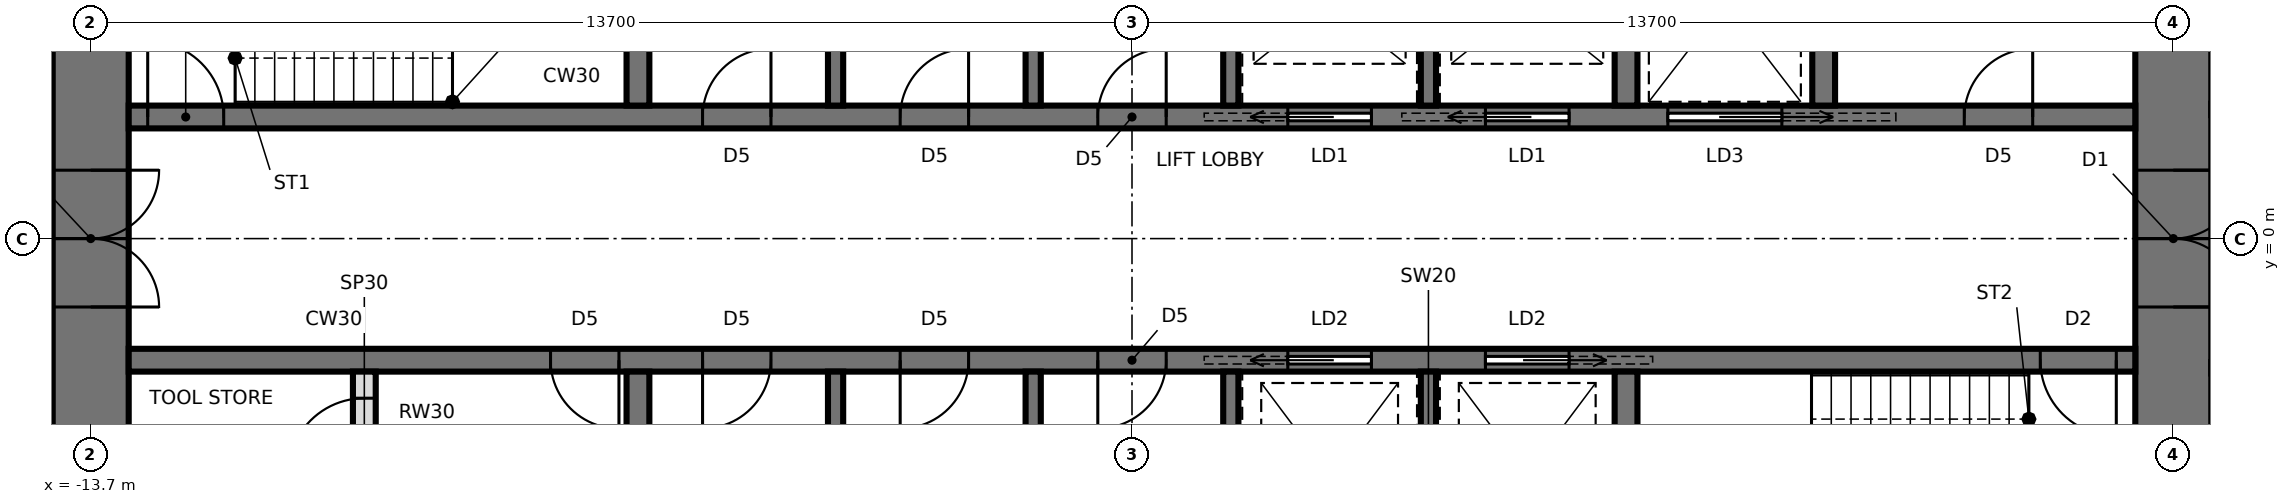
"""IFC4 building model, lengths in metres.
Left out: names, types, materials, properties, quantities, classifications, styles, units other than length and angle.
Written with IfcOpenShell. Run it as: python <this file> out.ifc"""

import sys

from ifc_helpers import new_model, si_unit, direction, frame, frame_2d, origin, place, context, subcontext, project, spatial, rectangle, extrude, element, fill, save


model = new_model("IFC4")
c1 = context("Model", 3, precision=1e-05, world=origin(), true_north=direction((0.0, 1.0)))
c2 = subcontext(c1, "Body", "Model", "MODEL_VIEW")
j1 = project(units=[si_unit("LENGTHUNIT", "METRE"), si_unit("PLANEANGLEUNIT", "RADIAN")], contexts=[c1])
p1 = place(None, origin())
s1 = spatial("IfcSite", under=j1, at=p1, CompositionType="ELEMENT")
p2 = place(p1, origin())
s2 = spatial("IfcBuilding", under=s1, at=p2, CompositionType="ELEMENT")
p3 = place(p2, frame((0.0, 0.0, 256.0)))
s3 = spatial("IfcBuildingStorey", under=s2, at=p3, CompositionType="ELEMENT", Elevation=256.0)
p4 = place(p3, frame((13.7, -9.5, 0.0), z_axis=(0.0, 0.0, 1.0), x_axis=(0.0, 1.0, 0.0)))
e1 = element("IfcWall", 1, at=p4, inside=s3, PredefinedType="SHEAR", context=c2, shape_type="SweptSolid", body=[
    extrude(rectangle(XDim=19.0, YDim=1.0, at=frame_2d((9.5, 0.0))), origin(), (0.0, 0.0, 1.0), 4.2),
])
p5 = place(p4, frame((8.6, 0.0, 0.0)))
e2 = element("IfcOpeningElement", 2, at=p5, cuts=e1, PredefinedType="OPENING", context=c2, shape_type="SweptSolid", body=[
    extrude(rectangle(XDim=1.8, YDim=2.4, at=frame_2d((0.9, 1.2))), frame((0.0, 0.51, 0.0), z_axis=(0.0, -1.0, 0.0), x_axis=(1.0, 0.0, 0.0)), (0.0, 0.0, 1.0), 1.02),
])
p6 = place(p3, frame((-13.7, 9.5, 0.0), z_axis=(0.0, 0.0, 1.0), x_axis=(0.0, -1.0, 0.0)))
e3 = element("IfcWall", 3, at=p6, inside=s3, PredefinedType="SHEAR", context=c2, shape_type="SweptSolid", body=[
    extrude(rectangle(XDim=19.0, YDim=1.0, at=frame_2d((9.5, 0.0))), origin(), (0.0, 0.0, 1.0), 4.2),
])
p7 = place(p6, frame((8.6, 0.0, 0.0)))
e4 = element("IfcOpeningElement", 4, at=p7, cuts=e3, PredefinedType="OPENING", context=c2, shape_type="SweptSolid", body=[
    extrude(rectangle(XDim=1.8, YDim=2.4, at=frame_2d((0.9, 1.2))), frame((0.0, 0.51, 0.0), z_axis=(0.0, -1.0, 0.0), x_axis=(1.0, 0.0, 0.0)), (0.0, 0.0, 1.0), 1.02),
])
p8 = place(p3, frame((-13.2, 1.6, 0.0), z_axis=(0.0, 0.0, 1.0), x_axis=(1.0, 0.0, 0.0)))
e5 = element("IfcWall", 5, at=p8, inside=s3, PredefinedType="SHEAR", context=c2, shape_type="SweptSolid", body=[
    extrude(rectangle(XDim=26.4, YDim=0.3, at=frame_2d((13.2, 0.0))), origin(), (0.0, 0.0, 1.0), 4.2),
])
p9 = place(p8, frame((0.25, 0.0, 0.0)))
e6 = element("IfcOpeningElement", 6, at=p9, cuts=e5, PredefinedType="OPENING", context=c2, shape_type="SweptSolid", body=[
    extrude(rectangle(XDim=1.0, YDim=2.1, at=frame_2d((0.5, 1.05))), frame((0.0, 0.16, 0.0), z_axis=(0.0, -1.0, 0.0), x_axis=(1.0, 0.0, 0.0)), (0.0, 0.0, 1.0), 0.32),
])
p10 = place(p8, frame((20.25, 0.0, 0.0)))
e7 = element("IfcOpeningElement", 7, at=p10, cuts=e5, PredefinedType="OPENING", context=c2, shape_type="SweptSolid", body=[
    extrude(rectangle(XDim=1.5, YDim=2.4, at=frame_2d((0.75, 1.2))), frame((0.0, 0.16, 0.0), z_axis=(0.0, -1.0, 0.0), x_axis=(1.0, 0.0, 0.0)), (0.0, 0.0, 1.0), 0.32),
])
p11 = place(p8, frame((7.55, 0.0, 0.0)))
e8 = element("IfcOpeningElement", 8, at=p11, cuts=e5, PredefinedType="OPENING", context=c2, shape_type="SweptSolid", body=[
    extrude(rectangle(XDim=0.9, YDim=2.1, at=frame_2d((0.45, 1.05))), frame((0.0, 0.16, 0.0), z_axis=(0.0, -1.0, 0.0), x_axis=(1.0, 0.0, 0.0)), (0.0, 0.0, 1.0), 0.32),
])
p12 = place(p8, frame((10.15, 0.0, 0.0)))
e9 = element("IfcOpeningElement", 9, at=p12, cuts=e5, PredefinedType="OPENING", context=c2, shape_type="SweptSolid", body=[
    extrude(rectangle(XDim=0.9, YDim=2.1, at=frame_2d((0.45, 1.05))), frame((0.0, 0.16, 0.0), z_axis=(0.0, -1.0, 0.0), x_axis=(1.0, 0.0, 0.0)), (0.0, 0.0, 1.0), 0.32),
])
p13 = place(p8, frame((12.75, 0.0, 0.0)))
e10 = element("IfcOpeningElement", 10, at=p13, cuts=e5, PredefinedType="OPENING", context=c2, shape_type="SweptSolid", body=[
    extrude(rectangle(XDim=0.9, YDim=2.1, at=frame_2d((0.45, 1.05))), frame((0.0, 0.16, 0.0), z_axis=(0.0, -1.0, 0.0), x_axis=(1.0, 0.0, 0.0)), (0.0, 0.0, 1.0), 0.32),
])
p14 = place(p8, frame((15.25, 0.0, 0.0)))
e11 = element("IfcOpeningElement", 11, at=p14, cuts=e5, PredefinedType="OPENING", context=c2, shape_type="SweptSolid", body=[
    extrude(rectangle(XDim=1.1, YDim=2.3, at=frame_2d((0.55, 1.15))), frame((0.0, 0.16, 0.0), z_axis=(0.0, -1.0, 0.0), x_axis=(1.0, 0.0, 0.0)), (0.0, 0.0, 1.0), 0.32),
])
p15 = place(p8, frame((17.85, 0.0, 0.0)))
e12 = element("IfcOpeningElement", 12, at=p15, cuts=e5, PredefinedType="OPENING", context=c2, shape_type="SweptSolid", body=[
    extrude(rectangle(XDim=1.1, YDim=2.3, at=frame_2d((0.55, 1.15))), frame((0.0, 0.16, 0.0), z_axis=(0.0, -1.0, 0.0), x_axis=(1.0, 0.0, 0.0)), (0.0, 0.0, 1.0), 0.32),
])
p16 = place(p8, frame((24.15, 0.0, 0.0)))
e13 = element("IfcOpeningElement", 13, at=p16, cuts=e5, PredefinedType="OPENING", context=c2, shape_type="SweptSolid", body=[
    extrude(rectangle(XDim=0.9, YDim=2.1, at=frame_2d((0.45, 1.05))), frame((0.0, 0.16, 0.0), z_axis=(0.0, -1.0, 0.0), x_axis=(1.0, 0.0, 0.0)), (0.0, 0.0, 1.0), 0.32),
])
p17 = place(p3, frame((-13.2, -1.6, 0.0), z_axis=(0.0, 0.0, 1.0), x_axis=(1.0, 0.0, 0.0)))
e14 = element("IfcWall", 14, at=p17, inside=s3, PredefinedType="SHEAR", context=c2, shape_type="SweptSolid", body=[
    extrude(rectangle(XDim=26.4, YDim=0.3, at=frame_2d((13.2, 0.0))), origin(), (0.0, 0.0, 1.0), 4.2),
])
p18 = place(p17, frame((25.15, 0.0, 0.0)))
e15 = element("IfcOpeningElement", 15, at=p18, cuts=e14, PredefinedType="OPENING", context=c2, shape_type="SweptSolid", body=[
    extrude(rectangle(XDim=1.0, YDim=2.1, at=frame_2d((0.5, 1.05))), frame((0.0, 0.16, 0.0), z_axis=(0.0, -1.0, 0.0), x_axis=(1.0, 0.0, 0.0)), (0.0, 0.0, 1.0), 0.32),
])
p19 = place(p17, frame((7.55, 0.0, 0.0)))
e16 = element("IfcOpeningElement", 16, at=p19, cuts=e14, PredefinedType="OPENING", context=c2, shape_type="SweptSolid", body=[
    extrude(rectangle(XDim=0.9, YDim=2.1, at=frame_2d((0.45, 1.05))), frame((0.0, 0.16, 0.0), z_axis=(0.0, -1.0, 0.0), x_axis=(1.0, 0.0, 0.0)), (0.0, 0.0, 1.0), 0.32),
])
p20 = place(p17, frame((10.15, 0.0, 0.0)))
e17 = element("IfcOpeningElement", 17, at=p20, cuts=e14, PredefinedType="OPENING", context=c2, shape_type="SweptSolid", body=[
    extrude(rectangle(XDim=0.9, YDim=2.1, at=frame_2d((0.45, 1.05))), frame((0.0, 0.16, 0.0), z_axis=(0.0, -1.0, 0.0), x_axis=(1.0, 0.0, 0.0)), (0.0, 0.0, 1.0), 0.32),
])
p21 = place(p17, frame((12.75, 0.0, 0.0)))
e18 = element("IfcOpeningElement", 18, at=p21, cuts=e14, PredefinedType="OPENING", context=c2, shape_type="SweptSolid", body=[
    extrude(rectangle(XDim=0.9, YDim=2.1, at=frame_2d((0.45, 1.05))), frame((0.0, 0.16, 0.0), z_axis=(0.0, -1.0, 0.0), x_axis=(1.0, 0.0, 0.0)), (0.0, 0.0, 1.0), 0.32),
])
p22 = place(p17, frame((15.25, 0.0, 0.0)))
e19 = element("IfcOpeningElement", 19, at=p22, cuts=e14, PredefinedType="OPENING", context=c2, shape_type="SweptSolid", body=[
    extrude(rectangle(XDim=1.1, YDim=2.3, at=frame_2d((0.55, 1.15))), frame((0.0, 0.16, 0.0), z_axis=(0.0, -1.0, 0.0), x_axis=(1.0, 0.0, 0.0)), (0.0, 0.0, 1.0), 0.32),
])
p23 = place(p17, frame((17.85, 0.0, 0.0)))
e20 = element("IfcOpeningElement", 20, at=p23, cuts=e14, PredefinedType="OPENING", context=c2, shape_type="SweptSolid", body=[
    extrude(rectangle(XDim=1.1, YDim=2.3, at=frame_2d((0.55, 1.15))), frame((0.0, 0.16, 0.0), z_axis=(0.0, -1.0, 0.0), x_axis=(1.0, 0.0, 0.0)), (0.0, 0.0, 1.0), 0.32),
])
p24 = place(p17, frame((5.55, 0.0, 0.0)))
e21 = element("IfcOpeningElement", 21, at=p24, cuts=e14, PredefinedType="OPENING", context=c2, shape_type="SweptSolid", body=[
    extrude(rectangle(XDim=0.9, YDim=2.1, at=frame_2d((0.45, 1.05))), frame((0.0, 0.16, 0.0), z_axis=(0.0, -1.0, 0.0), x_axis=(1.0, 0.0, 0.0)), (0.0, 0.0, 1.0), 0.32),
])
for number, where, z_axis, x_axis in (
    (22, (-6.5, 1.75, 0.0), (0.0, 0.0, 1.0), (0.0, 1.0, 0.0)),
    (23, (6.5, 1.75, 0.0), (0.0, 0.0, 1.0), (0.0, 1.0, 0.0)),
):
    element("IfcWall", number, at=place(p3, frame(where, z_axis=z_axis, x_axis=x_axis)), inside=s3, PredefinedType="SHEAR", context=c2, shape_type="SweptSolid", body=[
        extrude(rectangle(XDim=2.7, YDim=0.3, at=frame_2d((1.35, 0.0))), origin(), (0.0, 0.0, 1.0), 4.2),
    ])
for number, where, z_axis, x_axis in (
    (24, (-3.9, 1.75, 0.0), (0.0, 0.0, 1.0), (0.0, 1.0, 0.0)),
    (25, (-1.3, 1.75, 0.0), (0.0, 0.0, 1.0), (0.0, 1.0, 0.0)),
    (26, (1.3, 1.75, 0.0), (0.0, 0.0, 1.0), (0.0, 1.0, 0.0)),
    (27, (3.9, 1.75, 0.0), (0.0, 0.0, 1.0), (0.0, 1.0, 0.0)),
):
    element("IfcWall", number, at=place(p3, frame(where, z_axis=z_axis, x_axis=x_axis)), inside=s3, PredefinedType="SHEAR", context=c2, shape_type="SweptSolid", body=[
        extrude(rectangle(XDim=2.7, YDim=0.2, at=frame_2d((1.35, 0.0))), origin(), (0.0, 0.0, 1.0), 4.2),
    ])
for number, where, z_axis, x_axis in (
    (28, (-6.5, -1.75, 0.0), (0.0, 0.0, 1.0), (0.0, -1.0, 0.0)),
    (29, (6.5, -1.75, 0.0), (0.0, 0.0, 1.0), (0.0, -1.0, 0.0)),
):
    element("IfcWall", number, at=place(p3, frame(where, z_axis=z_axis, x_axis=x_axis)), inside=s3, PredefinedType="SHEAR", context=c2, shape_type="SweptSolid", body=[
        extrude(rectangle(XDim=2.7, YDim=0.3, at=frame_2d((1.35, 0.0))), origin(), (0.0, 0.0, 1.0), 4.2),
    ])
for number, where, z_axis, x_axis in (
    (30, (-3.9, -1.75, 0.0), (0.0, 0.0, 1.0), (0.0, -1.0, 0.0)),
    (31, (-1.3, -1.75, 0.0), (0.0, 0.0, 1.0), (0.0, -1.0, 0.0)),
    (32, (1.3, -1.75, 0.0), (0.0, 0.0, 1.0), (0.0, -1.0, 0.0)),
    (33, (3.9, -1.75, 0.0), (0.0, 0.0, 1.0), (0.0, -1.0, 0.0)),
):
    element("IfcWall", number, at=place(p3, frame(where, z_axis=z_axis, x_axis=x_axis)), inside=s3, PredefinedType="SHEAR", context=c2, shape_type="SweptSolid", body=[
        extrude(rectangle(XDim=2.7, YDim=0.2, at=frame_2d((1.35, 0.0))), origin(), (0.0, 0.0, 1.0), 4.2),
    ])
p25 = place(p3, frame((9.1, 1.75, 0.0), z_axis=(0.0, 0.0, 1.0), x_axis=(0.0, 1.0, 0.0)))
e34 = element("IfcWall", 34, at=p25, inside=s3, PredefinedType="SHEAR", context=c2, shape_type="SweptSolid", body=[
    extrude(rectangle(XDim=2.7, YDim=0.3, at=frame_2d((1.35, 0.0))), origin(), (0.0, 0.0, 1.0), 4.2),
])
p26 = place(p3, frame((-10.1, -3.25, 0.0), z_axis=(0.0, 0.0, 1.0), x_axis=(0.0, 1.0, 0.0)))
e35 = element("IfcWall", 35, at=p26, inside=s3, PredefinedType="PARTITIONING", context=c2, shape_type="SweptSolid", body=[
    extrude(rectangle(XDim=1.5, YDim=0.3, at=frame_2d((0.75, 0.0))), origin(), (0.0, 0.0, 1.0), 4.04),
])
p27 = place(p26, frame((0.15, 0.0, 0.0)))
e36 = element("IfcOpeningElement", 36, at=p27, cuts=e35, PredefinedType="OPENING", context=c2, shape_type="SweptSolid", body=[
    extrude(rectangle(XDim=1.0, YDim=2.4, at=frame_2d((0.5, 1.2))), frame((0.0, 0.16, 0.0), z_axis=(0.0, -1.0, 0.0), x_axis=(1.0, 0.0, 0.0)), (0.0, 0.0, 1.0), 0.32),
])
p28 = place(p3, frame((19.6, 1.7, 0.0), z_axis=(0.0, 0.0, 1.0), x_axis=(-1.0, 0.0, 0.0)))
e37 = element("IfcWall", 37, at=p28, inside=s3, PredefinedType="PARTITIONING", context=c2, shape_type="SweptSolid", body=[
    extrude(rectangle(XDim=5.4, YDim=0.15, at=frame_2d((2.7, 0.0))), origin(), (0.0, 0.0, 1.0), 4.04),
])
p29 = place(p7, origin())
e38 = element("IfcDoor", 38, at=p29, inside=s3, OperationType="DOUBLE_DOOR_SINGLE_SWING", PredefinedType="DOOR", context=c2, shape_type="SweptSolid", body=[
    extrude(rectangle(XDim=1.72, YDim=2.36, at=frame_2d((0.9, 1.18))), frame((0.0, 0.025, 0.0), z_axis=(0.0, -1.0, 0.0), x_axis=(1.0, 0.0, 0.0)), (0.0, 0.0, 1.0), 0.05),
    extrude(rectangle(XDim=0.04, YDim=2.4, at=frame_2d((0.02, 1.2))), frame((0.0, 0.25, 0.0), z_axis=(0.0, -1.0, 0.0), x_axis=(1.0, 0.0, 0.0)), (0.0, 0.0, 1.0), 0.5),
    extrude(rectangle(XDim=0.04, YDim=2.4, at=frame_2d((1.78, 1.2))), frame((0.0, 0.25, 0.0), z_axis=(0.0, -1.0, 0.0), x_axis=(1.0, 0.0, 0.0)), (0.0, 0.0, 1.0), 0.5),
    extrude(rectangle(XDim=1.72, YDim=0.04, at=frame_2d((0.9, 2.38))), frame((0.0, 0.25, 0.0), z_axis=(0.0, -1.0, 0.0), x_axis=(1.0, 0.0, 0.0)), (0.0, 0.0, 1.0), 0.5),
])
fill(e4, e38)
p30 = place(p5, frame((1.8, 0.0, 0.0), z_axis=(0.0, 0.0, 1.0), x_axis=(-1.0, 0.0, 0.0)))
e39 = element("IfcDoor", 39, at=p30, inside=s3, OperationType="DOUBLE_DOOR_SINGLE_SWING", PredefinedType="DOOR", context=c2, shape_type="SweptSolid", body=[
    extrude(rectangle(XDim=1.72, YDim=2.36, at=frame_2d((0.9, 1.18))), frame((0.0, 0.025, 0.0), z_axis=(0.0, -1.0, 0.0), x_axis=(1.0, 0.0, 0.0)), (0.0, 0.0, 1.0), 0.05),
    extrude(rectangle(XDim=0.04, YDim=2.4, at=frame_2d((1.78, 1.2))), frame((0.0, 0.25, 0.0), z_axis=(0.0, -1.0, 0.0), x_axis=(1.0, 0.0, 0.0)), (0.0, 0.0, 1.0), 0.5),
    extrude(rectangle(XDim=0.04, YDim=2.4, at=frame_2d((0.02, 1.2))), frame((0.0, 0.25, 0.0), z_axis=(0.0, -1.0, 0.0), x_axis=(1.0, 0.0, 0.0)), (0.0, 0.0, 1.0), 0.5),
    extrude(rectangle(XDim=1.72, YDim=0.04, at=frame_2d((0.9, 2.38))), frame((0.0, 0.25, 0.0), z_axis=(0.0, -1.0, 0.0), x_axis=(1.0, 0.0, 0.0)), (0.0, 0.0, 1.0), 0.5),
])
fill(e2, e39)
p31 = place(p9, origin())
e40 = element("IfcDoor", 40, at=p31, inside=s3, OperationType="SINGLE_SWING_LEFT", PredefinedType="DOOR", context=c2, shape_type="SweptSolid", body=[
    extrude(rectangle(XDim=1.0, YDim=2.1, at=frame_2d((0.5, 1.05))), frame((0.0, 0.025, 0.0), z_axis=(0.0, -1.0, 0.0), x_axis=(1.0, 0.0, 0.0)), (0.0, 0.0, 1.0), 0.05),
])
fill(e6, e40)
p32 = place(p18, frame((1.0, 0.0, 0.0), z_axis=(0.0, 0.0, 1.0), x_axis=(-1.0, 0.0, 0.0)))
e41 = element("IfcDoor", 41, at=p32, inside=s3, OperationType="SINGLE_SWING_LEFT", PredefinedType="DOOR", context=c2, shape_type="SweptSolid", body=[
    extrude(rectangle(XDim=1.0, YDim=2.1, at=frame_2d((0.5, 1.05))), frame((0.0, 0.025, 0.0), z_axis=(0.0, -1.0, 0.0), x_axis=(1.0, 0.0, 0.0)), (0.0, 0.0, 1.0), 0.05),
])
fill(e15, e41)
p33 = place(p10, origin())
e42 = element("IfcDoor", 42, at=p33, inside=s3, OperationType="SLIDING_TO_RIGHT", PredefinedType="DOOR", context=c2, shape_type="SweptSolid", body=[
    extrude(rectangle(XDim=1.5, YDim=2.4, at=frame_2d((0.75, 1.2))), frame((0.0, 0.025, 0.0), z_axis=(0.0, -1.0, 0.0), x_axis=(1.0, 0.0, 0.0)), (0.0, 0.0, 1.0), 0.05),
])
fill(e7, e42)
p34 = place(p11, origin())
e43 = element("IfcDoor", 43, at=p34, inside=s3, OperationType="SINGLE_SWING_RIGHT", PredefinedType="DOOR", context=c2, shape_type="SweptSolid", body=[
    extrude(rectangle(XDim=0.9, YDim=2.1, at=frame_2d((0.45, 1.05))), frame((0.0, 0.025, 0.0), z_axis=(0.0, -1.0, 0.0), x_axis=(1.0, 0.0, 0.0)), (0.0, 0.0, 1.0), 0.05),
])
fill(e8, e43)
p35 = place(p12, origin())
e44 = element("IfcDoor", 44, at=p35, inside=s3, OperationType="SINGLE_SWING_RIGHT", PredefinedType="DOOR", context=c2, shape_type="SweptSolid", body=[
    extrude(rectangle(XDim=0.9, YDim=2.1, at=frame_2d((0.45, 1.05))), frame((0.0, 0.025, 0.0), z_axis=(0.0, -1.0, 0.0), x_axis=(1.0, 0.0, 0.0)), (0.0, 0.0, 1.0), 0.05),
])
fill(e9, e44)
p36 = place(p13, origin())
e45 = element("IfcDoor", 45, at=p36, inside=s3, OperationType="SINGLE_SWING_RIGHT", PredefinedType="DOOR", context=c2, shape_type="SweptSolid", body=[
    extrude(rectangle(XDim=0.9, YDim=2.1, at=frame_2d((0.45, 1.05))), frame((0.0, 0.025, 0.0), z_axis=(0.0, -1.0, 0.0), x_axis=(1.0, 0.0, 0.0)), (0.0, 0.0, 1.0), 0.05),
])
fill(e10, e45)
p37 = place(p14, origin())
e46 = element("IfcDoor", 46, at=p37, inside=s3, OperationType="SLIDING_TO_LEFT", PredefinedType="DOOR", context=c2, shape_type="SweptSolid", body=[
    extrude(rectangle(XDim=1.1, YDim=2.3, at=frame_2d((0.55, 1.15))), frame((0.0, 0.025, 0.0), z_axis=(0.0, -1.0, 0.0), x_axis=(1.0, 0.0, 0.0)), (0.0, 0.0, 1.0), 0.05),
])
fill(e11, e46)
p38 = place(p15, origin())
e47 = element("IfcDoor", 47, at=p38, inside=s3, OperationType="SLIDING_TO_LEFT", PredefinedType="DOOR", context=c2, shape_type="SweptSolid", body=[
    extrude(rectangle(XDim=1.1, YDim=2.3, at=frame_2d((0.55, 1.15))), frame((0.0, 0.025, 0.0), z_axis=(0.0, -1.0, 0.0), x_axis=(1.0, 0.0, 0.0)), (0.0, 0.0, 1.0), 0.05),
])
fill(e12, e47)
p39 = place(p19, frame((0.9, 0.0, 0.0), z_axis=(0.0, 0.0, 1.0), x_axis=(-1.0, 0.0, 0.0)))
e48 = element("IfcDoor", 48, at=p39, inside=s3, OperationType="SINGLE_SWING_RIGHT", PredefinedType="DOOR", context=c2, shape_type="SweptSolid", body=[
    extrude(rectangle(XDim=0.9, YDim=2.1, at=frame_2d((0.45, 1.05))), frame((0.0, 0.025, 0.0), z_axis=(0.0, -1.0, 0.0), x_axis=(1.0, 0.0, 0.0)), (0.0, 0.0, 1.0), 0.05),
])
fill(e16, e48)
p40 = place(p20, frame((0.9, 0.0, 0.0), z_axis=(0.0, 0.0, 1.0), x_axis=(-1.0, 0.0, 0.0)))
e49 = element("IfcDoor", 49, at=p40, inside=s3, OperationType="SINGLE_SWING_RIGHT", PredefinedType="DOOR", context=c2, shape_type="SweptSolid", body=[
    extrude(rectangle(XDim=0.9, YDim=2.1, at=frame_2d((0.45, 1.05))), frame((0.0, 0.025, 0.0), z_axis=(0.0, -1.0, 0.0), x_axis=(1.0, 0.0, 0.0)), (0.0, 0.0, 1.0), 0.05),
])
fill(e17, e49)
p41 = place(p21, frame((0.9, 0.0, 0.0), z_axis=(0.0, 0.0, 1.0), x_axis=(-1.0, 0.0, 0.0)))
e50 = element("IfcDoor", 50, at=p41, inside=s3, OperationType="SINGLE_SWING_RIGHT", PredefinedType="DOOR", context=c2, shape_type="SweptSolid", body=[
    extrude(rectangle(XDim=0.9, YDim=2.1, at=frame_2d((0.45, 1.05))), frame((0.0, 0.025, 0.0), z_axis=(0.0, -1.0, 0.0), x_axis=(1.0, 0.0, 0.0)), (0.0, 0.0, 1.0), 0.05),
])
fill(e18, e50)
p42 = place(p22, frame((1.1, 0.0, 0.0), z_axis=(0.0, 0.0, 1.0), x_axis=(-1.0, 0.0, 0.0)))
e51 = element("IfcDoor", 51, at=p42, inside=s3, OperationType="SLIDING_TO_RIGHT", PredefinedType="DOOR", context=c2, shape_type="SweptSolid", body=[
    extrude(rectangle(XDim=1.1, YDim=2.3, at=frame_2d((0.55, 1.15))), frame((0.0, 0.025, 0.0), z_axis=(0.0, -1.0, 0.0), x_axis=(1.0, 0.0, 0.0)), (0.0, 0.0, 1.0), 0.05),
])
fill(e19, e51)
p43 = place(p23, frame((1.1, 0.0, 0.0), z_axis=(0.0, 0.0, 1.0), x_axis=(-1.0, 0.0, 0.0)))
e52 = element("IfcDoor", 52, at=p43, inside=s3, OperationType="SLIDING_TO_LEFT", PredefinedType="DOOR", context=c2, shape_type="SweptSolid", body=[
    extrude(rectangle(XDim=1.1, YDim=2.3, at=frame_2d((0.55, 1.15))), frame((0.0, 0.025, 0.0), z_axis=(0.0, -1.0, 0.0), x_axis=(1.0, 0.0, 0.0)), (0.0, 0.0, 1.0), 0.05),
])
fill(e20, e52)
p44 = place(p16, origin())
e53 = element("IfcDoor", 53, at=p44, inside=s3, OperationType="SINGLE_SWING_RIGHT", PredefinedType="DOOR", context=c2, shape_type="SweptSolid", body=[
    extrude(rectangle(XDim=0.9, YDim=2.1, at=frame_2d((0.45, 1.05))), frame((0.0, 0.025, 0.0), z_axis=(0.0, -1.0, 0.0), x_axis=(1.0, 0.0, 0.0)), (0.0, 0.0, 1.0), 0.05),
])
fill(e13, e53)
p45 = place(p24, frame((0.9, 0.0, 0.0), z_axis=(0.0, 0.0, 1.0), x_axis=(-1.0, 0.0, 0.0)))
e54 = element("IfcDoor", 54, at=p45, inside=s3, OperationType="SINGLE_SWING_LEFT", PredefinedType="DOOR", context=c2, shape_type="SweptSolid", body=[
    extrude(rectangle(XDim=0.9, YDim=2.1, at=frame_2d((0.45, 1.05))), frame((0.0, 0.025, 0.0), z_axis=(0.0, -1.0, 0.0), x_axis=(1.0, 0.0, 0.0)), (0.0, 0.0, 1.0), 0.05),
])
fill(e21, e54)
p46 = place(p27, origin())
e55 = element("IfcDoor", 55, at=p46, inside=s3, OperationType="SINGLE_SWING_LEFT", PredefinedType="DOOR", context=c2, shape_type="SweptSolid", body=[
    extrude(rectangle(XDim=1.0, YDim=2.4, at=frame_2d((0.5, 1.2))), frame((0.0, 0.025, 0.0), z_axis=(0.0, -1.0, 0.0), x_axis=(1.0, 0.0, 0.0)), (0.0, 0.0, 1.0), 0.05),
])
fill(e36, e55)
save(model, sys.argv[1])
